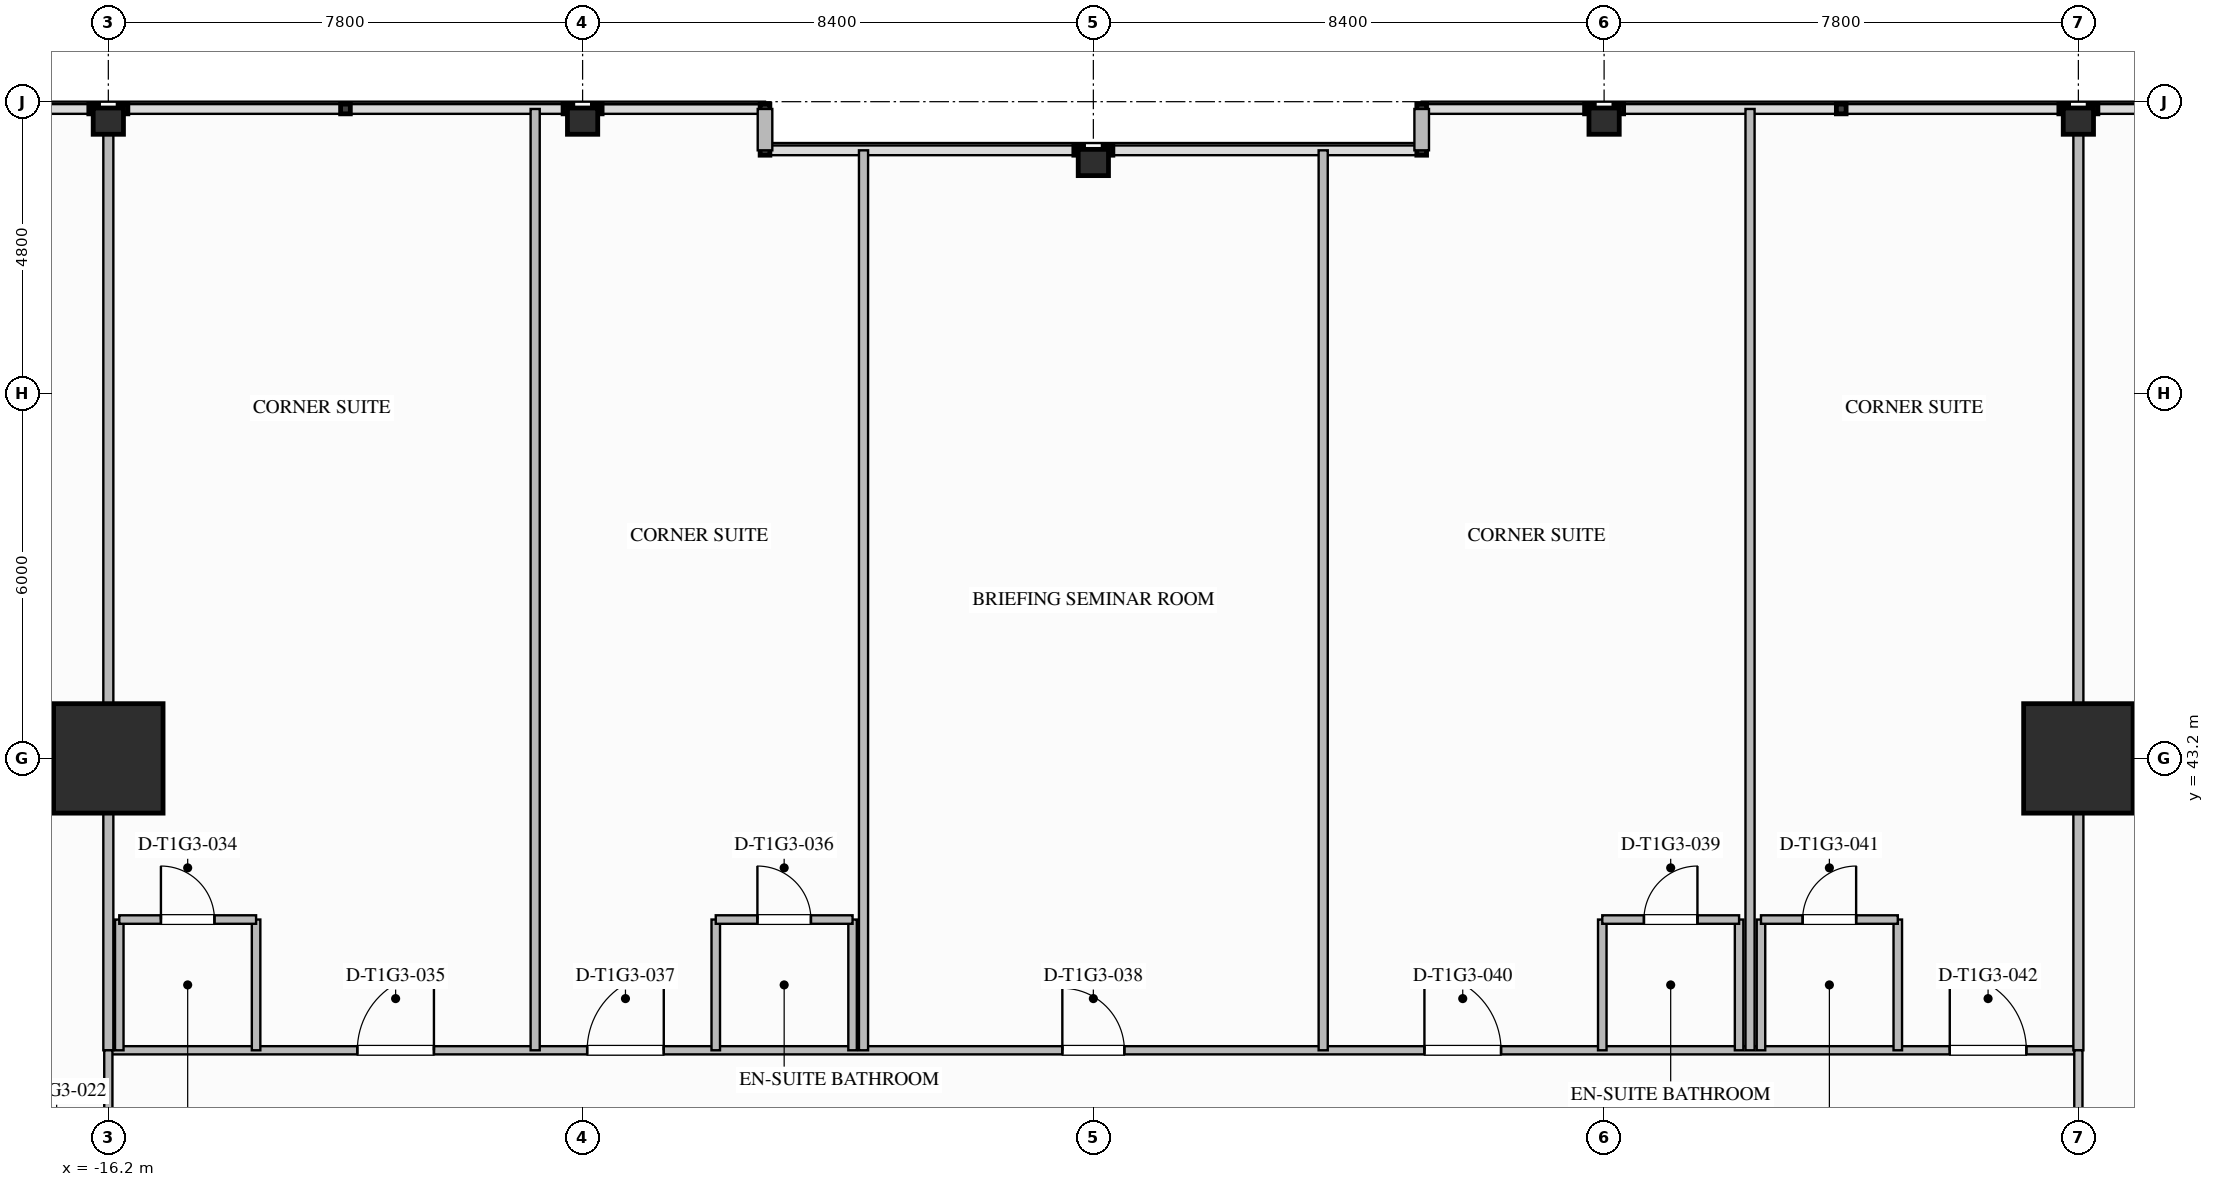
"""IFC4 building model, lengths in metres.
Left out: names, types, materials, properties, quantities, classifications, styles, units other than length and angle.
Written with IfcOpenShell. Run it as: python <this file> out.ifc"""

import sys

from ifc_helpers import new_model, si_unit, direction, frame, frame_2d, origin, origin_2d, place, context, subcontext, project, spatial, rectangle, i_section, extrude, element, fill, save


model = new_model("IFC4")
c1 = context("Model", 3, precision=1e-05, world=origin(), true_north=direction((0.0, 1.0)))
c2 = subcontext(c1, "Body", "Model", "MODEL_VIEW")
j1 = project(units=[si_unit("LENGTHUNIT", "METRE"), si_unit("PLANEANGLEUNIT", "RADIAN")], contexts=[c1])
p1 = place(None, origin())
s1 = spatial("IfcSite", under=j1, at=p1, CompositionType="ELEMENT")
p2 = place(p1, origin())
s2 = spatial("IfcBuilding", under=s1, at=p2, CompositionType="ELEMENT")
p3 = place(p2, frame((0.0, 0.0, 54.2)))
s3 = spatial("IfcBuildingStorey", under=s2, at=p3, CompositionType="ELEMENT", Elevation=54.2)
for number, where, z_axis, x_axis in (
    (1, (-16.2, 43.2, 0.0), (0.0, 0.0, 1.0), (1.0, 0.0, 0.0)),
    (2, (16.2, 43.2, 0.0), (0.0, 0.0, 1.0), (1.0, 0.0, 0.0)),
):
    element("IfcColumn", number, at=place(p3, frame(where, z_axis=z_axis, x_axis=x_axis)), inside=s3, PredefinedType="COLUMN", context=c2, shape_type="SweptSolid", body=[
        extrude(rectangle(XDim=1.8, YDim=1.8, at=origin_2d()), origin(), (0.0, 0.0, 1.0), 3.5),
    ])
for number, where, z_axis, x_axis in (
    (3, (-16.2, 53.68, 0.0), (0.0, 0.0, 1.0), (0.0, 1.0, 0.0)),
    (4, (-8.4, 53.68, 0.0), (0.0, 0.0, 1.0), (0.0, 1.0, 0.0)),
    (5, (0.0, 53.0, 0.0), (0.0, 0.0, 1.0), (0.0, 1.0, 0.0)),
    (6, (8.4, 53.68, 0.0), (0.0, 0.0, 1.0), (0.0, 1.0, 0.0)),
    (7, (16.2, 53.68, 0.0), (0.0, 0.0, 1.0), (0.0, 1.0, 0.0)),
):
    element("IfcColumn", number, at=place(p3, frame(where, z_axis=z_axis, x_axis=x_axis)), inside=s3, PredefinedType="COLUMN", context=c2, shape_type="SweptSolid", body=[
        extrude(i_section(OverallWidth=0.432, OverallDepth=0.498, WebThickness=0.056, FlangeThickness=0.089, FilletRadius=0.03, at=origin_2d()), origin(), (0.0, 0.0, 1.0), 3.497),
    ])
for number, where, z_axis, x_axis in (
    (8, (-5.4, 53.88, 0.0), (0.0, 0.0, 1.0), (0.0, -1.0, 0.0)),
    (9, (5.4, 53.2, 0.0), (0.0, 0.0, 1.0), (0.0, 1.0, 0.0)),
):
    element("IfcWall", number, at=place(p3, frame(where, z_axis=z_axis, x_axis=x_axis)), inside=s3, PredefinedType="STANDARD", context=c2, shape_type="SweptSolid", body=[
        extrude(rectangle(XDim=0.68, YDim=0.24, at=frame_2d((0.34, 0.0))), origin(), (0.0, 0.0, 1.0), 3.24),
    ])
p4 = place(p3, frame((-16.2, 38.4, 0.0), z_axis=(0.0, 0.0, 1.0), x_axis=(1.0, 0.0, 0.0)))
e10 = element("IfcWall", 10, at=p4, inside=s3, PredefinedType="PARTITIONING", context=c2, shape_type="SweptSolid", body=[
    extrude(rectangle(XDim=32.4, YDim=0.135, at=frame_2d((16.2, 0.0))), origin(), (0.0, 0.0, 1.0), 3.24),
])
p5 = place(p4, frame((4.095, 0.0, 0.0)))
e11 = element("IfcOpeningElement", 11, at=p5, cuts=e10, PredefinedType="OPENING", context=c2, shape_type="SweptSolid", body=[
    extrude(rectangle(XDim=1.26, YDim=2.2, at=frame_2d((0.63, 1.1))), frame((0.0, 0.077, 0.0), z_axis=(0.0, -1.0, 0.0), x_axis=(1.0, 0.0, 0.0)), (0.0, 0.0, 1.0), 0.155),
])
p6 = place(p4, frame((7.875, 0.0, 0.0)))
e12 = element("IfcOpeningElement", 12, at=p6, cuts=e10, PredefinedType="OPENING", context=c2, shape_type="SweptSolid", body=[
    extrude(rectangle(XDim=1.26, YDim=2.2, at=frame_2d((0.63, 1.1))), frame((0.0, 0.077, 0.0), z_axis=(0.0, -1.0, 0.0), x_axis=(1.0, 0.0, 0.0)), (0.0, 0.0, 1.0), 0.155),
])
p7 = place(p4, frame((15.69, 0.0, 0.0)))
e13 = element("IfcOpeningElement", 13, at=p7, cuts=e10, PredefinedType="OPENING", context=c2, shape_type="SweptSolid", body=[
    extrude(rectangle(XDim=1.02, YDim=2.15, at=frame_2d((0.51, 1.075))), frame((0.0, 0.077, 0.0), z_axis=(0.0, -1.0, 0.0), x_axis=(1.0, 0.0, 0.0)), (0.0, 0.0, 1.0), 0.155),
])
p8 = place(p4, frame((21.645, 0.0, 0.0)))
e14 = element("IfcOpeningElement", 14, at=p8, cuts=e10, PredefinedType="OPENING", context=c2, shape_type="SweptSolid", body=[
    extrude(rectangle(XDim=1.26, YDim=2.2, at=frame_2d((0.63, 1.1))), frame((0.0, 0.077, 0.0), z_axis=(0.0, -1.0, 0.0), x_axis=(1.0, 0.0, 0.0)), (0.0, 0.0, 1.0), 0.155),
])
p9 = place(p4, frame((30.285, 0.0, 0.0)))
e15 = element("IfcOpeningElement", 15, at=p9, cuts=e10, PredefinedType="OPENING", context=c2, shape_type="SweptSolid", body=[
    extrude(rectangle(XDim=1.26, YDim=2.2, at=frame_2d((0.63, 1.1))), frame((0.0, 0.077, 0.0), z_axis=(0.0, -1.0, 0.0), x_axis=(1.0, 0.0, 0.0)), (0.0, 0.0, 1.0), 0.155),
])
for number, where, z_axis, x_axis in (
    (16, (-16.2, 38.4, 0.0), (0.0, 0.0, 1.0), (0.0, 1.0, 0.0)),
    (17, (16.2, 38.4, 0.0), (0.0, 0.0, 1.0), (0.0, 1.0, 0.0)),
):
    element("IfcWall", number, at=place(p3, frame(where, z_axis=z_axis, x_axis=x_axis)), inside=s3, PredefinedType="PARTITIONING", context=c2, shape_type="SweptSolid", body=[
        extrude(rectangle(XDim=15.48, YDim=0.165, at=frame_2d((7.74, 0.0))), origin(), (0.0, 0.0, 1.0), 2.298),
    ])
p10 = place(p3, frame((-16.2, 35.7, 0.0), z_axis=(0.0, 0.0, 1.0), x_axis=(0.0, 1.0, 0.0)))
e18 = element("IfcWall", 18, at=p10, inside=s3, PredefinedType="PARTITIONING", context=c2, shape_type="SweptSolid", body=[
    extrude(rectangle(XDim=2.7, YDim=0.135, at=frame_2d((1.35, 0.0))), origin(), (0.0, 0.0, 1.0), 2.298),
])
p11 = place(p10, frame((0.52, 0.0, 0.0)))
e19 = element("IfcOpeningElement", 19, at=p11, cuts=e18, PredefinedType="OPENING", context=c2, shape_type="SweptSolid", body=[
    extrude(rectangle(XDim=1.02, YDim=2.15, at=frame_2d((0.51, 1.075))), frame((0.0, 0.077, 0.0), z_axis=(0.0, -1.0, 0.0), x_axis=(1.0, 0.0, 0.0)), (0.0, 0.0, 1.0), 0.155),
])
p12 = place(p3, frame((16.2, 35.7, 0.0), z_axis=(0.0, 0.0, 1.0), x_axis=(0.0, 1.0, 0.0)))
e20 = element("IfcWall", 20, at=p12, inside=s3, PredefinedType="PARTITIONING", context=c2, shape_type="SweptSolid", body=[
    extrude(rectangle(XDim=2.7, YDim=0.135, at=frame_2d((1.35, 0.0))), origin(), (0.0, 0.0, 1.0), 2.298),
])
p13 = place(p12, frame((0.52, 0.0, 0.0)))
e21 = element("IfcOpeningElement", 21, at=p13, cuts=e20, PredefinedType="OPENING", context=c2, shape_type="SweptSolid", body=[
    extrude(rectangle(XDim=1.02, YDim=2.15, at=frame_2d((0.51, 1.075))), frame((0.0, 0.077, 0.0), z_axis=(0.0, -1.0, 0.0), x_axis=(1.0, 0.0, 0.0)), (0.0, 0.0, 1.0), 0.155),
])
p14 = place(p3, frame((-16.02, 38.4, 0.0), z_axis=(0.0, 0.0, 1.0), x_axis=(0.0, 1.0, 0.0)))
e22 = element("IfcWall", 22, at=p14, inside=s3, PredefinedType="PLUMBINGWALL", context=c2, shape_type="SweptSolid", body=[
    extrude(rectangle(XDim=2.15, YDim=0.14, at=frame_2d((1.075, 0.0))), origin(), (0.0, 0.0, 1.0), 2.298),
])
p15 = place(p3, frame((-13.77, 38.4, 0.0), z_axis=(0.0, 0.0, 1.0), x_axis=(0.0, 1.0, 0.0)))
e23 = element("IfcWall", 23, at=p15, inside=s3, PredefinedType="PLUMBINGWALL", context=c2, shape_type="SweptSolid", body=[
    extrude(rectangle(XDim=2.15, YDim=0.14, at=frame_2d((1.075, 0.0))), origin(), (0.0, 0.0, 1.0), 3.24),
])
p16 = place(p3, frame((-16.02, 40.55, 0.0), z_axis=(0.0, 0.0, 1.0), x_axis=(1.0, 0.0, 0.0)))
e24 = element("IfcWall", 24, at=p16, inside=s3, PredefinedType="PLUMBINGWALL", context=c2, shape_type="SweptSolid", body=[
    extrude(rectangle(XDim=2.25, YDim=0.14, at=frame_2d((1.125, 0.0))), origin(), (0.0, 0.0, 1.0), 3.24),
])
p17 = place(p16, frame((0.685, 0.0, 0.0)))
e25 = element("IfcOpeningElement", 25, at=p17, cuts=e24, PredefinedType="OPENING", context=c2, shape_type="SweptSolid", body=[
    extrude(rectangle(XDim=0.88, YDim=2.1, at=frame_2d((0.44, 1.05))), frame((0.0, 0.08, 0.0), z_axis=(0.0, -1.0, 0.0), x_axis=(1.0, 0.0, 0.0)), (0.0, 0.0, 1.0), 0.16),
])
p18 = place(p3, frame((-9.18, 38.4, 0.0), z_axis=(0.0, 0.0, 1.0), x_axis=(0.0, 1.0, 0.0)))
e26 = element("IfcWall", 26, at=p18, inside=s3, PredefinedType="PARTITIONING", context=c2, shape_type="SweptSolid", body=[
    extrude(rectangle(XDim=15.48, YDim=0.15, at=frame_2d((7.74, 0.0))), origin(), (0.0, 0.0, 1.0), 3.24),
])
for number, where, z_axis, x_axis in (
    (27, (-6.21, 38.4, 0.0), (0.0, 0.0, 1.0), (0.0, 1.0, 0.0)),
    (28, (-3.96, 38.4, 0.0), (0.0, 0.0, 1.0), (0.0, 1.0, 0.0)),
):
    element("IfcWall", number, at=place(p3, frame(where, z_axis=z_axis, x_axis=x_axis)), inside=s3, PredefinedType="PLUMBINGWALL", context=c2, shape_type="SweptSolid", body=[
        extrude(rectangle(XDim=2.15, YDim=0.14, at=frame_2d((1.075, 0.0))), origin(), (0.0, 0.0, 1.0), 3.24),
    ])
p19 = place(p3, frame((-6.21, 40.55, 0.0), z_axis=(0.0, 0.0, 1.0), x_axis=(1.0, 0.0, 0.0)))
e29 = element("IfcWall", 29, at=p19, inside=s3, PredefinedType="PLUMBINGWALL", context=c2, shape_type="SweptSolid", body=[
    extrude(rectangle(XDim=2.25, YDim=0.14, at=frame_2d((1.125, 0.0))), origin(), (0.0, 0.0, 1.0), 3.24),
])
p20 = place(p19, frame((0.685, 0.0, 0.0)))
e30 = element("IfcOpeningElement", 30, at=p20, cuts=e29, PredefinedType="OPENING", context=c2, shape_type="SweptSolid", body=[
    extrude(rectangle(XDim=0.88, YDim=2.1, at=frame_2d((0.44, 1.05))), frame((0.0, 0.08, 0.0), z_axis=(0.0, -1.0, 0.0), x_axis=(1.0, 0.0, 0.0)), (0.0, 0.0, 1.0), 0.16),
])
for number, where, z_axis, x_axis in (
    (31, (-3.78, 38.4, 0.0), (0.0, 0.0, 1.0), (0.0, 1.0, 0.0)),
    (32, (3.78, 38.4, 0.0), (0.0, 0.0, 1.0), (0.0, 1.0, 0.0)),
):
    element("IfcWall", number, at=place(p3, frame(where, z_axis=z_axis, x_axis=x_axis)), inside=s3, PredefinedType="PARTITIONING", context=c2, shape_type="SweptSolid", body=[
        extrude(rectangle(XDim=14.8, YDim=0.15, at=frame_2d((7.4, 0.0))), origin(), (0.0, 0.0, 1.0), 3.24),
    ])
p21 = place(p3, frame((8.37, 38.4, 0.0), z_axis=(0.0, 0.0, 1.0), x_axis=(0.0, 1.0, 0.0)))
e33 = element("IfcWall", 33, at=p21, inside=s3, PredefinedType="PLUMBINGWALL", context=c2, shape_type="SweptSolid", body=[
    extrude(rectangle(XDim=2.15, YDim=0.14, at=frame_2d((1.075, 0.0))), origin(), (0.0, 0.0, 1.0), 2.617),
])
p22 = place(p3, frame((10.62, 38.4, 0.0), z_axis=(0.0, 0.0, 1.0), x_axis=(0.0, 1.0, 0.0)))
e34 = element("IfcWall", 34, at=p22, inside=s3, PredefinedType="PLUMBINGWALL", context=c2, shape_type="SweptSolid", body=[
    extrude(rectangle(XDim=2.15, YDim=0.14, at=frame_2d((1.075, 0.0))), origin(), (0.0, 0.0, 1.0), 3.24),
])
p23 = place(p3, frame((8.37, 40.55, 0.0), z_axis=(0.0, 0.0, 1.0), x_axis=(1.0, 0.0, 0.0)))
e35 = element("IfcWall", 35, at=p23, inside=s3, PredefinedType="PLUMBINGWALL", context=c2, shape_type="SweptSolid", body=[
    extrude(rectangle(XDim=2.25, YDim=0.14, at=frame_2d((1.125, 0.0))), origin(), (0.0, 0.0, 1.0), 3.24),
])
p24 = place(p23, frame((0.685, 0.0, 0.0)))
e36 = element("IfcOpeningElement", 36, at=p24, cuts=e35, PredefinedType="OPENING", context=c2, shape_type="SweptSolid", body=[
    extrude(rectangle(XDim=0.88, YDim=2.1, at=frame_2d((0.44, 1.05))), frame((0.0, 0.08, 0.0), z_axis=(0.0, -1.0, 0.0), x_axis=(1.0, 0.0, 0.0)), (0.0, 0.0, 1.0), 0.16),
])
p25 = place(p3, frame((10.8, 38.4, 0.0), z_axis=(0.0, 0.0, 1.0), x_axis=(0.0, 1.0, 0.0)))
e37 = element("IfcWall", 37, at=p25, inside=s3, PredefinedType="PARTITIONING", context=c2, shape_type="SweptSolid", body=[
    extrude(rectangle(XDim=15.48, YDim=0.15, at=frame_2d((7.74, 0.0))), origin(), (0.0, 0.0, 1.0), 3.24),
])
for number, where, z_axis, x_axis in (
    (38, (10.98, 38.4, 0.0), (0.0, 0.0, 1.0), (0.0, 1.0, 0.0)),
    (39, (13.23, 38.4, 0.0), (0.0, 0.0, 1.0), (0.0, 1.0, 0.0)),
):
    element("IfcWall", number, at=place(p3, frame(where, z_axis=z_axis, x_axis=x_axis)), inside=s3, PredefinedType="PLUMBINGWALL", context=c2, shape_type="SweptSolid", body=[
        extrude(rectangle(XDim=2.15, YDim=0.14, at=frame_2d((1.075, 0.0))), origin(), (0.0, 0.0, 1.0), 3.24),
    ])
p26 = place(p3, frame((10.98, 40.55, 0.0), z_axis=(0.0, 0.0, 1.0), x_axis=(1.0, 0.0, 0.0)))
e40 = element("IfcWall", 40, at=p26, inside=s3, PredefinedType="PLUMBINGWALL", context=c2, shape_type="SweptSolid", body=[
    extrude(rectangle(XDim=2.25, YDim=0.14, at=frame_2d((1.125, 0.0))), origin(), (0.0, 0.0, 1.0), 3.24),
])
p27 = place(p26, frame((0.685, 0.0, 0.0)))
e41 = element("IfcOpeningElement", 41, at=p27, cuts=e40, PredefinedType="OPENING", context=c2, shape_type="SweptSolid", body=[
    extrude(rectangle(XDim=0.88, YDim=2.1, at=frame_2d((0.44, 1.05))), frame((0.0, 0.08, 0.0), z_axis=(0.0, -1.0, 0.0), x_axis=(1.0, 0.0, 0.0)), (0.0, 0.0, 1.0), 0.16),
])
p28 = place(p17, origin())
e42 = element("IfcDoor", 42, at=p28, inside=s3, OperationType="SINGLE_SWING_LEFT", PredefinedType="DOOR", context=c2, shape_type="SweptSolid", body=[
    extrude(rectangle(XDim=0.88, YDim=2.1, at=frame_2d((0.44, 1.05))), frame((0.0, 0.025, 0.0), z_axis=(0.0, -1.0, 0.0), x_axis=(1.0, 0.0, 0.0)), (0.0, 0.0, 1.0), 0.05),
])
fill(e25, e42)
p29 = place(p5, origin())
e43 = element("IfcDoor", 43, at=p29, inside=s3, OperationType="SINGLE_SWING_RIGHT", PredefinedType="DOOR", context=c2, shape_type="SweptSolid", body=[
    extrude(rectangle(XDim=1.26, YDim=2.2, at=frame_2d((0.63, 1.1))), frame((0.0, 0.025, 0.0), z_axis=(0.0, -1.0, 0.0), x_axis=(1.0, 0.0, 0.0)), (0.0, 0.0, 1.0), 0.05),
])
fill(e11, e43)
p30 = place(p20, origin())
e44 = element("IfcDoor", 44, at=p30, inside=s3, OperationType="SINGLE_SWING_LEFT", PredefinedType="DOOR", context=c2, shape_type="SweptSolid", body=[
    extrude(rectangle(XDim=0.88, YDim=2.1, at=frame_2d((0.44, 1.05))), frame((0.0, 0.025, 0.0), z_axis=(0.0, -1.0, 0.0), x_axis=(1.0, 0.0, 0.0)), (0.0, 0.0, 1.0), 0.05),
])
fill(e30, e44)
p31 = place(p6, origin())
e45 = element("IfcDoor", 45, at=p31, inside=s3, OperationType="SINGLE_SWING_RIGHT", PredefinedType="DOOR", context=c2, shape_type="SweptSolid", body=[
    extrude(rectangle(XDim=1.26, YDim=2.2, at=frame_2d((0.63, 1.1))), frame((0.0, 0.025, 0.0), z_axis=(0.0, -1.0, 0.0), x_axis=(1.0, 0.0, 0.0)), (0.0, 0.0, 1.0), 0.05),
])
fill(e12, e45)
p32 = place(p7, origin())
e46 = element("IfcDoor", 46, at=p32, inside=s3, OperationType="SINGLE_SWING_LEFT", PredefinedType="DOOR", context=c2, shape_type="SweptSolid", body=[
    extrude(rectangle(XDim=1.02, YDim=2.15, at=frame_2d((0.51, 1.075))), frame((0.0, 0.025, 0.0), z_axis=(0.0, -1.0, 0.0), x_axis=(1.0, 0.0, 0.0)), (0.0, 0.0, 1.0), 0.05),
])
fill(e13, e46)
p33 = place(p24, origin())
e47 = element("IfcDoor", 47, at=p33, inside=s3, OperationType="SINGLE_SWING_RIGHT", PredefinedType="DOOR", context=c2, shape_type="SweptSolid", body=[
    extrude(rectangle(XDim=0.88, YDim=2.1, at=frame_2d((0.44, 1.05))), frame((0.0, 0.025, 0.0), z_axis=(0.0, -1.0, 0.0), x_axis=(1.0, 0.0, 0.0)), (0.0, 0.0, 1.0), 0.05),
])
fill(e36, e47)
p34 = place(p8, origin())
e48 = element("IfcDoor", 48, at=p34, inside=s3, OperationType="SINGLE_SWING_LEFT", PredefinedType="DOOR", context=c2, shape_type="SweptSolid", body=[
    extrude(rectangle(XDim=1.26, YDim=2.2, at=frame_2d((0.63, 1.1))), frame((0.0, 0.025, 0.0), z_axis=(0.0, -1.0, 0.0), x_axis=(1.0, 0.0, 0.0)), (0.0, 0.0, 1.0), 0.05),
])
fill(e14, e48)
p35 = place(p27, origin())
e49 = element("IfcDoor", 49, at=p35, inside=s3, OperationType="SINGLE_SWING_RIGHT", PredefinedType="DOOR", context=c2, shape_type="SweptSolid", body=[
    extrude(rectangle(XDim=0.88, YDim=2.1, at=frame_2d((0.44, 1.05))), frame((0.0, 0.025, 0.0), z_axis=(0.0, -1.0, 0.0), x_axis=(1.0, 0.0, 0.0)), (0.0, 0.0, 1.0), 0.05),
])
fill(e41, e49)
p36 = place(p9, origin())
e50 = element("IfcDoor", 50, at=p36, inside=s3, OperationType="SINGLE_SWING_LEFT", PredefinedType="DOOR", context=c2, shape_type="SweptSolid", body=[
    extrude(rectangle(XDim=1.26, YDim=2.2, at=frame_2d((0.63, 1.1))), frame((0.0, 0.025, 0.0), z_axis=(0.0, -1.0, 0.0), x_axis=(1.0, 0.0, 0.0)), (0.0, 0.0, 1.0), 0.05),
])
fill(e15, e50)
save(model, sys.argv[1])
